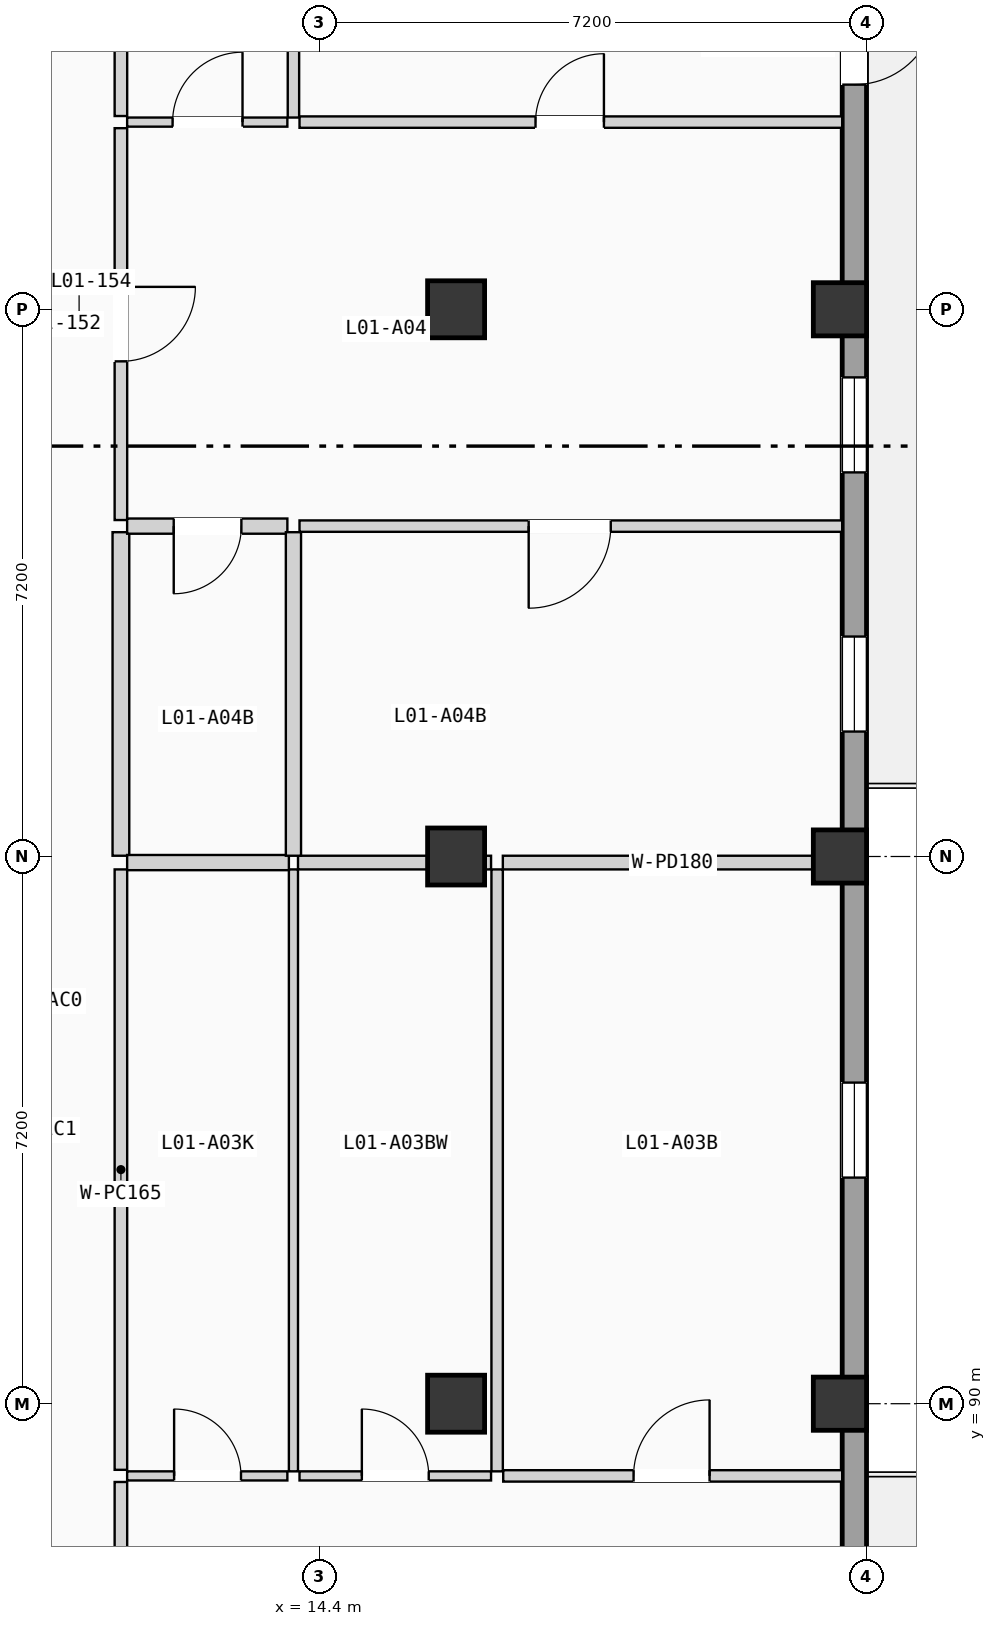
"""IFC4 building model, lengths in metres.
Left out: names, types, materials, properties, quantities, classifications, styles, units other than length and angle.
Written with IfcOpenShell. Run it as: python <this file> out.ifc"""

import sys

from ifc_helpers import new_model, si_unit, direction, frame, frame_2d, origin, origin_2d, place, context, subcontext, project, spatial, rectangle, extrude, element, fill, save


model = new_model("IFC4")
c1 = context("Model", 3, precision=1e-05, world=origin(), true_north=direction((0.0, 1.0)))
c2 = subcontext(c1, "Body", "Model", "MODEL_VIEW")
j1 = project(units=[si_unit("LENGTHUNIT", "METRE"), si_unit("PLANEANGLEUNIT", "RADIAN")], contexts=[c1])
p1 = place(None, origin())
s1 = spatial("IfcSite", under=j1, at=p1, CompositionType="ELEMENT")
p2 = place(p1, origin())
s2 = spatial("IfcBuilding", under=s1, at=p2, CompositionType="ELEMENT")
p3 = place(p2, frame((0.0, 0.0, 4.9)))
s3 = spatial("IfcBuildingStorey", under=s2, at=p3, CompositionType="ELEMENT", Elevation=4.9)
for number, where, z_axis, x_axis in (
    (1, (16.2, 90.0, 0.0), (0.0, 0.0, 1.0), (1.0, 0.0, 0.0)),
    (2, (16.2, 97.2, 0.0), (0.0, 0.0, 1.0), (1.0, 0.0, 0.0)),
    (3, (16.2, 104.4, 0.0), (0.0, 0.0, 1.0), (1.0, 0.0, 0.0)),
):
    element("IfcColumn", number, at=place(p3, frame(where, z_axis=z_axis, x_axis=x_axis)), inside=s3, PredefinedType="COLUMN", context=c2, shape_type="SweptSolid", body=[
        extrude(rectangle(XDim=0.75, YDim=0.75, at=origin_2d()), origin(), (0.0, 0.0, 1.0), 3.675),
    ])
for number, where, z_axis, x_axis in (
    (4, (21.25, 90.0, 0.0), (0.0, 0.0, 1.0), (1.0, 0.0, 0.0)),
    (5, (21.25, 97.2, 0.0), (0.0, 0.0, 1.0), (1.0, 0.0, 0.0)),
    (6, (21.25, 104.4, 0.0), (0.0, 0.0, 1.0), (1.0, 0.0, 0.0)),
):
    element("IfcColumn", number, at=place(p3, frame(where, z_axis=z_axis, x_axis=x_axis)), inside=s3, PredefinedType="COLUMN", context=c2, shape_type="SweptSolid", body=[
        extrude(rectangle(XDim=0.7, YDim=0.7, at=origin_2d()), origin(), (0.0, 0.0, 1.0), 3.675),
    ])
p4 = place(p3, frame((21.44, 68.72, 0.0), z_axis=(0.0, 0.0, 1.0), x_axis=(0.0, 1.0, 0.0)))
e7 = element("IfcWall", 7, at=p4, inside=s3, PredefinedType="SOLIDWALL", context=c2, shape_type="SweptSolid", body=[
    extrude(rectangle(XDim=49.76, YDim=0.32, at=frame_2d((24.88, 0.0))), origin(), (0.0, 0.0, 1.0), 3.415),
])
p5 = place(p4, frame((16.38, 0.0, 0.0)))
e8 = element("IfcOpeningElement", 8, at=p5, cuts=e7, PredefinedType="OPENING", context=c2, shape_type="SweptSolid", body=[
    extrude(rectangle(XDim=0.95, YDim=2.15, at=frame_2d((0.475, 1.075))), frame((0.0, 0.17, 0.0), z_axis=(0.0, -1.0, 0.0), x_axis=(1.0, 0.0, 0.0)), (0.0, 0.0, 1.0), 0.34),
])
p6 = place(p4, frame((9.92, 0.0, 0.9)))
e9 = element("IfcOpeningElement", 9, at=p6, cuts=e7, PredefinedType="OPENING", context=c2, shape_type="SweptSolid", body=[
    extrude(rectangle(XDim=1.25, YDim=1.2, at=frame_2d((0.625, 0.6))), frame((0.0, 0.17, 0.0), z_axis=(0.0, -1.0, 0.0), x_axis=(1.0, 0.0, 0.0)), (0.0, 0.0, 1.0), 0.34),
])
p7 = place(p4, frame((24.255, 0.0, 0.9)))
e10 = element("IfcOpeningElement", 10, at=p7, cuts=e7, PredefinedType="OPENING", context=c2, shape_type="SweptSolid", body=[
    extrude(rectangle(XDim=1.25, YDim=1.35, at=frame_2d((0.625, 0.675))), frame((0.0, 0.17, 0.0), z_axis=(0.0, -1.0, 0.0), x_axis=(1.0, 0.0, 0.0)), (0.0, 0.0, 1.0), 0.34),
])
p8 = place(p4, frame((33.534, 0.0, 0.9)))
e11 = element("IfcOpeningElement", 11, at=p8, cuts=e7, PredefinedType="OPENING", context=c2, shape_type="SweptSolid", body=[
    extrude(rectangle(XDim=1.25, YDim=1.5, at=frame_2d((0.625, 0.75))), frame((0.0, 0.17, 0.0), z_axis=(0.0, -1.0, 0.0), x_axis=(1.0, 0.0, 0.0)), (0.0, 0.0, 1.0), 0.34),
])
p9 = place(p4, frame((30.124, 0.0, 0.9)))
e12 = element("IfcOpeningElement", 12, at=p9, cuts=e7, PredefinedType="OPENING", context=c2, shape_type="SweptSolid", body=[
    extrude(rectangle(XDim=1.25, YDim=1.65, at=frame_2d((0.625, 0.825))), frame((0.0, 0.17, 0.0), z_axis=(0.0, -1.0, 0.0), x_axis=(1.0, 0.0, 0.0)), (0.0, 0.0, 1.0), 0.34),
])
p10 = place(p4, frame((38.636, 0.0, 0.0)))
e13 = element("IfcOpeningElement", 13, at=p10, cuts=e7, PredefinedType="OPENING", context=c2, shape_type="SweptSolid", body=[
    extrude(rectangle(XDim=1.08, YDim=2.18, at=frame_2d((0.54, 1.09))), frame((0.0, 0.17, 0.0), z_axis=(0.0, -1.0, 0.0), x_axis=(1.0, 0.0, 0.0)), (0.0, 0.0, 1.0), 0.34),
])
p11 = place(p3, frame((11.79, 83.83, 0.0), z_axis=(0.0, 0.0, 1.0), x_axis=(0.0, 1.0, 0.0)))
e14 = element("IfcWall", 14, at=p11, inside=s3, PredefinedType="PARTITIONING", context=c2, shape_type="SweptSolid", body=[
    extrude(rectangle(XDim=5.14, YDim=0.165, at=frame_2d((2.57, 0.0))), origin(), (0.0, 0.0, 1.0), 3.395),
])
p12 = place(p11, frame((2.08, 0.0, 0.0)))
e15 = element("IfcOpeningElement", 15, at=p12, cuts=e14, PredefinedType="OPENING", context=c2, shape_type="SweptSolid", body=[
    extrude(rectangle(XDim=0.98, YDim=2.08, at=frame_2d((0.49, 1.04))), frame((0.0, 0.093, 0.0), z_axis=(0.0, -1.0, 0.0), x_axis=(1.0, 0.0, 0.0)), (0.0, 0.0, 1.0), 0.185),
])
p13 = place(p3, frame((11.79, 89.13, 0.0), z_axis=(0.0, 0.0, 1.0), x_axis=(0.0, 1.0, 0.0)))
e16 = element("IfcWall", 16, at=p13, inside=s3, PredefinedType="PARTITIONING", context=c2, shape_type="SweptSolid", body=[
    extrude(rectangle(XDim=7.9, YDim=0.165, at=frame_2d((3.95, 0.0))), origin(), (0.0, 0.0, 1.0), 3.395),
])
p14 = place(p3, frame((11.79, 101.627, 0.0), z_axis=(0.0, 0.0, 1.0), x_axis=(0.0, 1.0, 0.0)))
e17 = element("IfcWall", 17, at=p14, inside=s3, PredefinedType="PARTITIONING", context=c2, shape_type="SweptSolid", body=[
    extrude(rectangle(XDim=5.156, YDim=0.165, at=frame_2d((2.578, 0.0))), origin(), (0.0, 0.0, 1.0), 3.395),
])
p15 = place(p14, frame((2.088, 0.0, 0.0)))
e18 = element("IfcOpeningElement", 18, at=p15, cuts=e17, PredefinedType="OPENING", context=c2, shape_type="SweptSolid", body=[
    extrude(rectangle(XDim=0.98, YDim=2.08, at=frame_2d((0.49, 1.04))), frame((0.0, 0.093, 0.0), z_axis=(0.0, -1.0, 0.0), x_axis=(1.0, 0.0, 0.0)), (0.0, 0.0, 1.0), 0.185),
])
p16 = place(p3, frame((11.79, 97.21, 0.0), z_axis=(0.0, 0.0, 1.0), x_axis=(0.0, 1.0, 0.0)))
e19 = element("IfcWall", 19, at=p16, inside=s3, PredefinedType="PLUMBINGWALL", context=c2, shape_type="SweptSolid", body=[
    extrude(rectangle(XDim=4.257, YDim=0.22, at=frame_2d((2.128, 0.0))), origin(), (0.0, 0.0, 1.0), 3.395),
])
p17 = place(p3, frame((11.79, 106.943, 0.0), z_axis=(0.0, 0.0, 1.0), x_axis=(0.0, 1.0, 0.0)))
e20 = element("IfcWall", 20, at=p17, inside=s3, PredefinedType="PARTITIONING", context=c2, shape_type="SweptSolid", body=[
    extrude(rectangle(XDim=4.257, YDim=0.165, at=frame_2d((2.128, 0.0))), origin(), (0.0, 0.0, 1.0), 3.395),
])
p18 = place(p3, frame((11.872, 89.05, 0.0), z_axis=(0.0, 0.0, 1.0), x_axis=(1.0, 0.0, 0.0)))
e21 = element("IfcWall", 21, at=p18, inside=s3, PredefinedType="PARTITIONING", context=c2, shape_type="SweptSolid", body=[
    extrude(rectangle(XDim=2.108, YDim=0.12, at=frame_2d((1.054, 0.0))), origin(), (0.0, 0.0, 1.0), 3.395),
])
p19 = place(p18, frame((0.618, 0.0, 0.0)))
e22 = element("IfcOpeningElement", 22, at=p19, cuts=e21, PredefinedType="OPENING", context=c2, shape_type="SweptSolid", body=[
    extrude(rectangle(XDim=0.88, YDim=2.02, at=frame_2d((0.44, 1.01))), frame((0.0, 0.07, 0.0), z_axis=(0.0, -1.0, 0.0), x_axis=(1.0, 0.0, 0.0)), (0.0, 0.0, 1.0), 0.14),
])
p20 = place(p3, frame((16.82, 89.05, 0.0), z_axis=(0.0, 0.0, 1.0), x_axis=(1.0, 0.0, 0.0)))
e23 = element("IfcWall", 23, at=p20, inside=s3, PredefinedType="PARTITIONING", context=c2, shape_type="SweptSolid", body=[
    extrude(rectangle(XDim=4.46, YDim=0.15, at=frame_2d((2.23, 0.0))), origin(), (0.0, 0.0, 1.0), 3.395),
])
p21 = place(p20, frame((1.715, 0.0, 0.0)))
e24 = element("IfcOpeningElement", 24, at=p21, cuts=e23, PredefinedType="OPENING", context=c2, shape_type="SweptSolid", body=[
    extrude(rectangle(XDim=1.0, YDim=2.06, at=frame_2d((0.5, 1.03))), frame((0.0, 0.085, 0.0), z_axis=(0.0, -1.0, 0.0), x_axis=(1.0, 0.0, 0.0)), (0.0, 0.0, 1.0), 0.17),
])
p22 = place(p3, frame((14.14, 89.05, 0.0), z_axis=(0.0, 0.0, 1.0), x_axis=(1.0, 0.0, 0.0)))
e25 = element("IfcWall", 25, at=p22, inside=s3, PredefinedType="PARTITIONING", context=c2, shape_type="SweptSolid", body=[
    extrude(rectangle(XDim=2.52, YDim=0.12, at=frame_2d((1.26, 0.0))), origin(), (0.0, 0.0, 1.0), 3.395),
])
p23 = place(p22, frame((0.82, 0.0, 0.0)))
e26 = element("IfcOpeningElement", 26, at=p23, cuts=e25, PredefinedType="OPENING", context=c2, shape_type="SweptSolid", body=[
    extrude(rectangle(XDim=0.88, YDim=2.02, at=frame_2d((0.44, 1.01))), frame((0.0, 0.07, 0.0), z_axis=(0.0, -1.0, 0.0), x_axis=(1.0, 0.0, 0.0)), (0.0, 0.0, 1.0), 0.14),
])
p24 = place(p3, frame((14.06, 89.11, 0.0), z_axis=(0.0, 0.0, 1.0), x_axis=(0.0, 1.0, 0.0)))
e27 = element("IfcWall", 27, at=p24, inside=s3, PredefinedType="PARTITIONING", context=c2, shape_type="SweptSolid", body=[
    extrude(rectangle(XDim=7.92, YDim=0.12, at=frame_2d((3.96, 0.0))), origin(), (0.0, 0.0, 1.0), 3.395),
])
p25 = place(p3, frame((11.872, 97.12, 0.0), z_axis=(0.0, 0.0, 1.0), x_axis=(1.0, 0.0, 0.0)))
e28 = element("IfcWall", 28, at=p25, inside=s3, PredefinedType="PLUMBINGWALL", context=c2, shape_type="SweptSolid", body=[
    extrude(rectangle(XDim=2.128, YDim=0.2, at=frame_2d((1.064, 0.0))), origin(), (0.0, 0.0, 1.0), 2.685),
])
p26 = place(p3, frame((16.74, 89.11, 0.0), z_axis=(0.0, 0.0, 1.0), x_axis=(0.0, 1.0, 0.0)))
e29 = element("IfcWall", 29, at=p26, inside=s3, PredefinedType="PARTITIONING", context=c2, shape_type="SweptSolid", body=[
    extrude(rectangle(XDim=7.92, YDim=0.15, at=frame_2d((3.96, 0.0))), origin(), (0.0, 0.0, 1.0), 3.395),
])
p27 = place(p3, frame((16.815, 97.12, 0.0), z_axis=(0.0, 0.0, 1.0), x_axis=(1.0, 0.0, 0.0)))
e30 = element("IfcWall", 30, at=p27, inside=s3, PredefinedType="PARTITIONING", context=c2, shape_type="SweptSolid", body=[
    extrude(rectangle(XDim=4.465, YDim=0.18, at=frame_2d((2.232, 0.0))), origin(), (0.0, 0.0, 1.0), 2.735),
])
p28 = place(p3, frame((14.12, 97.12, 0.0), z_axis=(0.0, 0.0, 1.0), x_axis=(1.0, 0.0, 0.0)))
e31 = element("IfcWall", 31, at=p28, inside=s3, PredefinedType="PARTITIONING", context=c2, shape_type="SweptSolid", body=[
    extrude(rectangle(XDim=2.54, YDim=0.18, at=frame_2d((1.27, 0.0))), origin(), (0.0, 0.0, 1.0), 2.685),
])
p29 = place(p3, frame((11.872, 101.547, 0.0), z_axis=(0.0, 0.0, 1.0), x_axis=(1.0, 0.0, 0.0)))
e32 = element("IfcWall", 32, at=p29, inside=s3, PredefinedType="PLUMBINGWALL", context=c2, shape_type="SweptSolid", body=[
    extrude(rectangle(XDim=2.108, YDim=0.2, at=frame_2d((1.054, 0.0))), origin(), (0.0, 0.0, 1.0), 3.395),
])
p30 = place(p29, frame((0.613, 0.0, 0.0)))
e33 = element("IfcOpeningElement", 33, at=p30, cuts=e32, PredefinedType="OPENING", context=c2, shape_type="SweptSolid", body=[
    extrude(rectangle(XDim=0.89, YDim=2.03, at=frame_2d((0.445, 1.015))), frame((0.0, 0.11, 0.0), z_axis=(0.0, -1.0, 0.0), x_axis=(1.0, 0.0, 0.0)), (0.0, 0.0, 1.0), 0.22),
])
p31 = place(p3, frame((11.872, 106.863, 0.0), z_axis=(0.0, 0.0, 1.0), x_axis=(1.0, 0.0, 0.0)))
e34 = element("IfcWall", 34, at=p31, inside=s3, PredefinedType="PARTITIONING", context=c2, shape_type="SweptSolid", body=[
    extrude(rectangle(XDim=2.108, YDim=0.12, at=frame_2d((1.054, 0.0))), origin(), (0.0, 0.0, 1.0), 3.395),
])
p32 = place(p31, frame((0.598, 0.0, 0.0)))
e35 = element("IfcOpeningElement", 35, at=p32, cuts=e34, PredefinedType="OPENING", context=c2, shape_type="SweptSolid", body=[
    extrude(rectangle(XDim=0.92, YDim=2.02, at=frame_2d((0.46, 1.01))), frame((0.0, 0.07, 0.0), z_axis=(0.0, -1.0, 0.0), x_axis=(1.0, 0.0, 0.0)), (0.0, 0.0, 1.0), 0.14),
])
p33 = place(p3, frame((14.14, 101.547, 0.0), z_axis=(0.0, 0.0, 1.0), x_axis=(1.0, 0.0, 0.0)))
e36 = element("IfcWall", 36, at=p33, inside=s3, PredefinedType="PARTITIONING", context=c2, shape_type="SweptSolid", body=[
    extrude(rectangle(XDim=7.14, YDim=0.15, at=frame_2d((3.57, 0.0))), origin(), (0.0, 0.0, 1.0), 3.395),
])
p34 = place(p33, frame((3.015, 0.0, 0.0)))
e37 = element("IfcOpeningElement", 37, at=p34, cuts=e36, PredefinedType="OPENING", context=c2, shape_type="SweptSolid", body=[
    extrude(rectangle(XDim=1.08, YDim=2.1, at=frame_2d((0.54, 1.05))), frame((0.0, 0.085, 0.0), z_axis=(0.0, -1.0, 0.0), x_axis=(1.0, 0.0, 0.0)), (0.0, 0.0, 1.0), 0.17),
])
p35 = place(p3, frame((14.14, 106.863, 0.0), z_axis=(0.0, 0.0, 1.0), x_axis=(1.0, 0.0, 0.0)))
e38 = element("IfcWall", 38, at=p35, inside=s3, PredefinedType="PARTITIONING", context=c2, shape_type="SweptSolid", body=[
    extrude(rectangle(XDim=7.14, YDim=0.15, at=frame_2d((3.57, 0.0))), origin(), (0.0, 0.0, 1.0), 3.395),
])
p36 = place(p35, frame((3.105, 0.0, 0.0)))
e39 = element("IfcOpeningElement", 39, at=p36, cuts=e38, PredefinedType="OPENING", context=c2, shape_type="SweptSolid", body=[
    extrude(rectangle(XDim=0.9, YDim=2.04, at=frame_2d((0.45, 1.02))), frame((0.0, 0.085, 0.0), z_axis=(0.0, -1.0, 0.0), x_axis=(1.0, 0.0, 0.0)), (0.0, 0.0, 1.0), 0.17),
])
p37 = place(p3, frame((14.06, 97.21, 0.0), z_axis=(0.0, 0.0, 1.0), x_axis=(0.0, 1.0, 0.0)))
e40 = element("IfcWall", 40, at=p37, inside=s3, PredefinedType="PLUMBINGWALL", context=c2, shape_type="SweptSolid", body=[
    extrude(rectangle(XDim=4.257, YDim=0.2, at=frame_2d((2.128, 0.0))), origin(), (0.0, 0.0, 1.0), 3.395),
])
p38 = place(p3, frame((14.06, 106.923, 0.0), z_axis=(0.0, 0.0, 1.0), x_axis=(0.0, 1.0, 0.0)))
e41 = element("IfcWall", 41, at=p38, inside=s3, PredefinedType="PARTITIONING", context=c2, shape_type="SweptSolid", body=[
    extrude(rectangle(XDim=4.277, YDim=0.15, at=frame_2d((2.138, 0.0))), origin(), (0.0, 0.0, 1.0), 3.395),
])
p39 = place(p7, origin())
e42 = element("IfcWindow", 42, at=p39, inside=s3, PartitioningType="SINGLE_PANEL", PredefinedType="WINDOW", context=c2, shape_type="SweptSolid", body=[
    extrude(rectangle(XDim=1.25, YDim=1.35, at=frame_2d((0.625, 0.675))), frame((0.0, 0.03, 0.0), z_axis=(0.0, -1.0, 0.0), x_axis=(1.0, 0.0, 0.0)), (0.0, 0.0, 1.0), 0.06),
])
fill(e10, e42)
p40 = place(p8, origin())
e43 = element("IfcWindow", 43, at=p40, inside=s3, PartitioningType="SINGLE_PANEL", PredefinedType="WINDOW", context=c2, shape_type="SweptSolid", body=[
    extrude(rectangle(XDim=1.25, YDim=1.5, at=frame_2d((0.625, 0.75))), frame((0.0, 0.03, 0.0), z_axis=(0.0, -1.0, 0.0), x_axis=(1.0, 0.0, 0.0)), (0.0, 0.0, 1.0), 0.06),
])
fill(e11, e43)
p41 = place(p9, origin())
e44 = element("IfcWindow", 44, at=p41, inside=s3, PartitioningType="SINGLE_PANEL", PredefinedType="WINDOW", context=c2, shape_type="SweptSolid", body=[
    extrude(rectangle(XDim=1.25, YDim=1.65, at=frame_2d((0.625, 0.825))), frame((0.0, 0.03, 0.0), z_axis=(0.0, -1.0, 0.0), x_axis=(1.0, 0.0, 0.0)), (0.0, 0.0, 1.0), 0.06),
])
fill(e12, e44)
p42 = place(p10, frame((1.08, 0.0, 0.0), z_axis=(0.0, 0.0, 1.0), x_axis=(-1.0, 0.0, 0.0)))
e45 = element("IfcDoor", 45, at=p42, inside=s3, OperationType="SINGLE_SWING_RIGHT", PredefinedType="DOOR", context=c2, shape_type="SweptSolid", body=[
    extrude(rectangle(XDim=1.08, YDim=2.18, at=frame_2d((0.54, 1.09))), frame((0.0, 0.025, 0.0), z_axis=(0.0, -1.0, 0.0), x_axis=(1.0, 0.0, 0.0)), (0.0, 0.0, 1.0), 0.05),
])
fill(e13, e45)
p43 = place(p15, frame((0.98, 0.0, 0.0), z_axis=(0.0, 0.0, 1.0), x_axis=(-1.0, 0.0, 0.0)))
e46 = element("IfcDoor", 46, at=p43, inside=s3, OperationType="SINGLE_SWING_RIGHT", PredefinedType="DOOR", context=c2, shape_type="SweptSolid", body=[
    extrude(rectangle(XDim=0.98, YDim=2.08, at=frame_2d((0.49, 1.04))), frame((0.0, 0.025, 0.0), z_axis=(0.0, -1.0, 0.0), x_axis=(1.0, 0.0, 0.0)), (0.0, 0.0, 1.0), 0.05),
])
fill(e18, e46)
p44 = place(p19, origin())
e47 = element("IfcDoor", 47, at=p44, inside=s3, OperationType="SINGLE_SWING_LEFT", PredefinedType="DOOR", context=c2, shape_type="SweptSolid", body=[
    extrude(rectangle(XDim=0.88, YDim=2.02, at=frame_2d((0.44, 1.01))), frame((0.0, 0.025, 0.0), z_axis=(0.0, -1.0, 0.0), x_axis=(1.0, 0.0, 0.0)), (0.0, 0.0, 1.0), 0.05),
])
fill(e22, e47)
p45 = place(p21, origin())
e48 = element("IfcDoor", 48, at=p45, inside=s3, OperationType="SINGLE_SWING_RIGHT", PredefinedType="DOOR", context=c2, shape_type="SweptSolid", body=[
    extrude(rectangle(XDim=1.0, YDim=2.06, at=frame_2d((0.5, 1.03))), frame((0.0, 0.025, 0.0), z_axis=(0.0, -1.0, 0.0), x_axis=(1.0, 0.0, 0.0)), (0.0, 0.0, 1.0), 0.05),
])
fill(e24, e48)
p46 = place(p23, origin())
e49 = element("IfcDoor", 49, at=p46, inside=s3, OperationType="SINGLE_SWING_LEFT", PredefinedType="DOOR", context=c2, shape_type="SweptSolid", body=[
    extrude(rectangle(XDim=0.88, YDim=2.02, at=frame_2d((0.44, 1.01))), frame((0.0, 0.025, 0.0), z_axis=(0.0, -1.0, 0.0), x_axis=(1.0, 0.0, 0.0)), (0.0, 0.0, 1.0), 0.05),
])
fill(e26, e49)
p47 = place(p30, frame((0.89, 0.0, 0.0), z_axis=(0.0, 0.0, 1.0), x_axis=(-1.0, 0.0, 0.0)))
e50 = element("IfcDoor", 50, at=p47, inside=s3, OperationType="SINGLE_SWING_LEFT", PredefinedType="DOOR", context=c2, shape_type="SweptSolid", body=[
    extrude(rectangle(XDim=0.89, YDim=2.03, at=frame_2d((0.445, 1.015))), frame((0.0, 0.025, 0.0), z_axis=(0.0, -1.0, 0.0), x_axis=(1.0, 0.0, 0.0)), (0.0, 0.0, 1.0), 0.05),
])
fill(e33, e50)
p48 = place(p32, origin())
e51 = element("IfcDoor", 51, at=p48, inside=s3, OperationType="SINGLE_SWING_RIGHT", PredefinedType="DOOR", context=c2, shape_type="SweptSolid", body=[
    extrude(rectangle(XDim=0.92, YDim=2.02, at=frame_2d((0.46, 1.01))), frame((0.0, 0.025, 0.0), z_axis=(0.0, -1.0, 0.0), x_axis=(1.0, 0.0, 0.0)), (0.0, 0.0, 1.0), 0.05),
])
fill(e35, e51)
p49 = place(p34, frame((1.08, 0.0, 0.0), z_axis=(0.0, 0.0, 1.0), x_axis=(-1.0, 0.0, 0.0)))
e52 = element("IfcDoor", 52, at=p49, inside=s3, OperationType="SINGLE_SWING_LEFT", PredefinedType="DOOR", context=c2, shape_type="SweptSolid", body=[
    extrude(rectangle(XDim=1.08, YDim=2.1, at=frame_2d((0.54, 1.05))), frame((0.0, 0.025, 0.0), z_axis=(0.0, -1.0, 0.0), x_axis=(1.0, 0.0, 0.0)), (0.0, 0.0, 1.0), 0.05),
])
fill(e37, e52)
p50 = place(p36, origin())
e53 = element("IfcDoor", 53, at=p50, inside=s3, OperationType="SINGLE_SWING_RIGHT", PredefinedType="DOOR", context=c2, shape_type="SweptSolid", body=[
    extrude(rectangle(XDim=0.9, YDim=2.04, at=frame_2d((0.45, 1.02))), frame((0.0, 0.025, 0.0), z_axis=(0.0, -1.0, 0.0), x_axis=(1.0, 0.0, 0.0)), (0.0, 0.0, 1.0), 0.05),
])
fill(e39, e53)
save(model, sys.argv[1])
